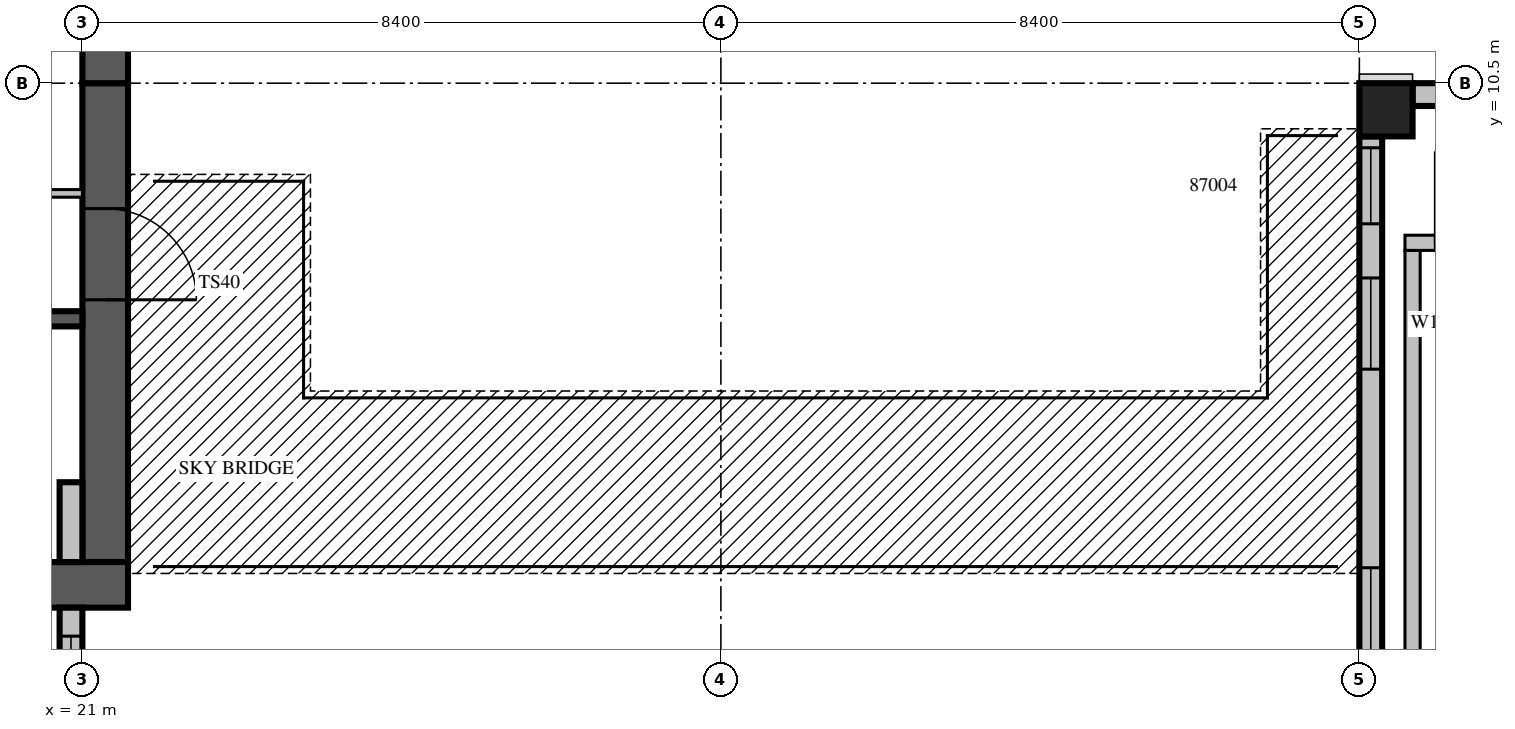
"""IFC4 building model, lengths in metres.
Left out: names, types, materials, properties, quantities, classifications, styles, units other than length and angle.
Written with IfcOpenShell. Run it as: python <this file> out.ifc"""

import sys

from ifc_helpers import new_model, si_unit, direction, frame, frame_2d, origin, origin_2d, place, context, subcontext, project, spatial, rectangle, extrude, source, transform, mapped, element, fill, save


model = new_model("IFC4")
c1 = context("Model", 3, precision=1e-05, world=origin(), true_north=direction((0.0, 1.0)))
c2 = subcontext(c1, "Body", "Model", "MODEL_VIEW")
j1 = project(units=[si_unit("LENGTHUNIT", "METRE"), si_unit("PLANEANGLEUNIT", "RADIAN")], contexts=[c1])
p1 = place(None, origin())
s1 = spatial("IfcSite", under=j1, at=p1, CompositionType="ELEMENT")
p2 = place(p1, origin())
s2 = spatial("IfcBuilding", under=s1, at=p2, CompositionType="ELEMENT")
p3 = place(p2, frame((0.0, 0.0, 305.5)))
s3 = spatial("IfcBuildingStorey", under=s2, at=p3, CompositionType="ELEMENT", Elevation=305.5)
m1 = source(origin(), c2, "Body", "SweptSolid", [
    extrude(rectangle(XDim=0.7, YDim=0.7, at=origin_2d()), origin(), (0.0, 0.0, 1.0), 3.5),
])
p4 = place(p3, frame((38.15, 10.15, 0.0), z_axis=(0.0, 0.0, 1.0), x_axis=(1.0, 0.0, 0.0)))
e1 = element("IfcColumn", 1, at=p4, inside=s3, PredefinedType="COLUMN", context=c2, shape_type="MappedRepresentation", body=[
    mapped(m1, transform((0.0, 0.0, 0.0), scale=1.0)),
])
m2 = source(origin(), c2, "Body", "SweptSolid", [
    extrude(rectangle(XDim=6.3, YDim=0.6, at=frame_2d((3.15, 0.0))), origin(), (0.0, 0.0, 1.0), 3.5),
])
p5 = place(p3, frame((21.3, 4.2, 0.0), z_axis=(0.0, 0.0, 1.0), x_axis=(0.0, 1.0, 0.0)))
e2 = element("IfcWall", 2, at=p5, inside=s3, PredefinedType="SHEAR", context=c2, shape_type="MappedRepresentation", body=[
    mapped(m2, transform((0.0, 0.0, 0.0), scale=1.0)),
])
m3 = source(origin(), c2, "Body", "SweptSolid", [
    extrude(rectangle(XDim=1.2, YDim=2.1, at=frame_2d((0.6, 1.05))), frame((0.0, 0.31, 0.0), z_axis=(0.0, -1.0, 0.0), x_axis=(1.0, 0.0, 0.0)), (0.0, 0.0, 1.0), 0.62),
])
p6 = place(p5, frame((3.45, 0.0, 0.0)))
e3 = element("IfcOpeningElement", 3, at=p6, cuts=e2, PredefinedType="OPENING", context=c2, shape_type="MappedRepresentation", body=[
    mapped(m3, transform((0.0, 0.0, 0.0), scale=1.0)),
])
m4 = source(origin(), c2, "Body", "SweptSolid", [
    extrude(rectangle(XDim=17.4, YDim=0.6, at=frame_2d((8.7, 0.0))), origin(), (0.0, 0.0, 1.0), 3.5),
])
p7 = place(p3, frame((4.2, 3.9, 0.0), z_axis=(0.0, 0.0, 1.0), x_axis=(1.0, 0.0, 0.0)))
e4 = element("IfcWall", 4, at=p7, inside=s3, PredefinedType="SHEAR", context=c2, shape_type="MappedRepresentation", body=[
    mapped(m4, transform((0.0, 0.0, 0.0), scale=1.0)),
])
m5 = source(origin(), c2, "Body", "SweptSolid", [
    extrude(rectangle(XDim=0.9, YDim=2.1, at=frame_2d((0.45, 1.05))), frame((0.0, 0.31, 0.0), z_axis=(0.0, -1.0, 0.0), x_axis=(1.0, 0.0, 0.0)), (0.0, 0.0, 1.0), 0.62),
])
p8 = place(p7, frame((12.8, 0.0, 0.0)))
e5 = element("IfcOpeningElement", 5, at=p8, cuts=e4, PredefinedType="OPENING", context=c2, shape_type="MappedRepresentation", body=[
    mapped(m5, transform((0.0, 0.0, 0.0), scale=1.0)),
])
m6 = source(origin(), c2, "Body", "SweptSolid", [
    extrude(rectangle(XDim=10.5, YDim=0.6, at=frame_2d((5.25, 0.0))), origin(), (0.0, 0.0, 1.0), 3.5),
])
p9 = place(p3, frame((21.3, 10.5, 0.0), z_axis=(0.0, 0.0, 1.0), x_axis=(0.0, 1.0, 0.0)))
e6 = element("IfcWall", 6, at=p9, inside=s3, PredefinedType="SHEAR", context=c2, shape_type="MappedRepresentation", body=[
    mapped(m6, transform((0.0, 0.0, 0.0), scale=1.0)),
])
m7 = source(origin(), c2, "Body", "SweptSolid", [
    extrude(rectangle(XDim=1.2, YDim=2.4, at=frame_2d((0.6, 1.2))), frame((0.0, 0.31, 0.0), z_axis=(0.0, -1.0, 0.0), x_axis=(1.0, 0.0, 0.0)), (0.0, 0.0, 1.0), 0.62),
])
p10 = place(p9, frame((5.7, 0.0, 0.6)))
e7 = element("IfcOpeningElement", 7, at=p10, cuts=e6, PredefinedType="OPENING", context=c2, shape_type="MappedRepresentation", body=[
    mapped(m7, transform((0.0, 0.0, 0.0), scale=1.0)),
])
m8 = source(origin(), c2, "Body", "SweptSolid", [
    extrude(rectangle(XDim=2.9, YDim=0.3, at=frame_2d((1.45, 0.0))), origin(), (0.0, 0.0, 1.0), 3.1),
])
p11 = place(p3, frame((20.85, 0.7, 0.0), z_axis=(0.0, 0.0, 1.0), x_axis=(0.0, 1.0, 0.0)))
e8 = element("IfcWall", 8, at=p11, inside=s3, PredefinedType="STANDARD", context=c2, shape_type="MappedRepresentation", body=[
    mapped(m8, transform((0.0, 0.0, 0.0), scale=1.0)),
])
m9 = source(origin(), c2, "Body", "SweptSolid", [
    extrude(rectangle(XDim=1.2, YDim=2.0, at=frame_2d((0.6, 1.0))), frame((0.0, 0.16, 0.0), z_axis=(0.0, -1.0, 0.0), x_axis=(1.0, 0.0, 0.0)), (0.0, 0.0, 1.0), 0.32),
])
p12 = place(p11, frame((1.325, 0.0, 0.6)))
e9 = element("IfcOpeningElement", 9, at=p12, cuts=e8, PredefinedType="OPENING", context=c2, shape_type="MappedRepresentation", body=[
    mapped(m9, transform((0.0, 0.0, 0.0), scale=1.0)),
])
m10 = source(origin(), c2, "Body", "SweptSolid", [
    extrude(rectangle(XDim=1.05, YDim=0.3, at=frame_2d((0.525, 0.0))), origin(), (0.0, 0.0, 1.0), 3.1),
])
p13 = place(p3, frame((20.85, 4.2, 0.0), z_axis=(0.0, 0.0, 1.0), x_axis=(0.0, 1.0, 0.0)))
e10 = element("IfcWall", 10, at=p13, inside=s3, PredefinedType="STANDARD", context=c2, shape_type="MappedRepresentation", body=[
    mapped(m10, transform((0.0, 0.0, 0.0), scale=1.0)),
])
m11 = source(origin(), c2, "Body", "SweptSolid", [
    extrude(rectangle(XDim=7.35, YDim=0.3, at=frame_2d((3.675, 0.0))), origin(), (0.0, 0.0, 1.0), 3.1),
])
p14 = place(p3, frame((45.85, 10.35, 0.0), z_axis=(0.0, 0.0, 1.0), x_axis=(-1.0, 0.0, 0.0)))
e11 = element("IfcWall", 11, at=p14, inside=s3, PredefinedType="STANDARD", context=c2, shape_type="MappedRepresentation", body=[
    mapped(m11, transform((0.0, 0.0, 0.0), scale=1.0)),
])
m12 = source(origin(), c2, "Body", "SweptSolid", [
    extrude(rectangle(XDim=3.0, YDim=2.0, at=frame_2d((1.5, 1.0))), frame((0.0, 0.16, 0.0), z_axis=(0.0, -1.0, 0.0), x_axis=(1.0, 0.0, 0.0)), (0.0, 0.0, 1.0), 0.32),
])
p15 = place(p14, frame((1.09, 0.0, 0.6)))
e12 = element("IfcOpeningElement", 12, at=p15, cuts=e11, PredefinedType="OPENING", context=c2, shape_type="MappedRepresentation", body=[
    mapped(m12, transform((0.0, 0.0, 0.0), scale=1.0)),
])
p16 = place(p14, frame((5.77, 0.0, 0.6)))
e13 = element("IfcOpeningElement", 13, at=p16, cuts=e11, PredefinedType="OPENING", context=c2, shape_type="MappedRepresentation", body=[
    mapped(m9, transform((0.0, 0.0, 0.0), scale=1.0)),
])
m13 = source(origin(), c2, "Body", "SweptSolid", [
    extrude(rectangle(XDim=9.1, YDim=0.3, at=frame_2d((4.55, 0.0))), origin(), (0.0, 0.0, 1.0), 3.1),
])
p17 = place(p3, frame((37.95, 9.8, 0.0), z_axis=(0.0, 0.0, 1.0), x_axis=(0.0, -1.0, 0.0)))
e14 = element("IfcWall", 14, at=p17, inside=s3, PredefinedType="STANDARD", context=c2, shape_type="MappedRepresentation", body=[
    mapped(m13, transform((0.0, 0.0, 0.0), scale=1.0)),
])
p18 = place(p17, frame((1.863, 0.0, 0.6)))
e15 = element("IfcOpeningElement", 15, at=p18, cuts=e14, PredefinedType="OPENING", context=c2, shape_type="MappedRepresentation", body=[
    mapped(m9, transform((0.0, 0.0, 0.0), scale=1.0)),
])
p19 = place(p17, frame((5.675, 0.0, 0.6)))
e16 = element("IfcOpeningElement", 16, at=p19, cuts=e14, PredefinedType="OPENING", context=c2, shape_type="MappedRepresentation", body=[
    mapped(m12, transform((0.0, 0.0, 0.0), scale=1.0)),
])
m14 = source(origin(), c2, "Body", "SweptSolid", [
    extrude(rectangle(XDim=1.0, YDim=2.1, at=frame_2d((0.5, 1.05))), frame((0.0, 0.16, 0.0), z_axis=(0.0, -1.0, 0.0), x_axis=(1.0, 0.0, 0.0)), (0.0, 0.0, 1.0), 0.32),
])
p20 = place(p17, frame((0.15, 0.0, 0.0)))
e17 = element("IfcOpeningElement", 17, at=p20, cuts=e14, PredefinedType="OPENING", context=c2, shape_type="MappedRepresentation", body=[
    mapped(m14, transform((0.0, 0.0, 0.0), scale=1.0)),
])
m15 = source(origin(), c2, "Body", "SweptSolid", [
    extrude(rectangle(XDim=7.2, YDim=0.2, at=frame_2d((3.6, 0.0))), origin(), (0.0, 0.0, 1.0), 3.1),
])
p21 = place(p3, frame((13.8, 7.4, 0.0), z_axis=(0.0, 0.0, 1.0), x_axis=(1.0, 0.0, 0.0)))
e18 = element("IfcWall", 18, at=p21, inside=s3, PredefinedType="SOLIDWALL", context=c2, shape_type="MappedRepresentation", body=[
    mapped(m15, transform((0.0, 0.0, 0.0), scale=1.0)),
])
m16 = source(origin(), c2, "Body", "SweptSolid", [
    extrude(rectangle(XDim=0.9, YDim=2.1, at=frame_2d((0.45, 1.05))), frame((0.0, 0.11, 0.0), z_axis=(0.0, -1.0, 0.0), x_axis=(1.0, 0.0, 0.0)), (0.0, 0.0, 1.0), 0.22),
])
p22 = place(p21, frame((3.15, 0.0, 0.0)))
e19 = element("IfcOpeningElement", 19, at=p22, cuts=e18, PredefinedType="OPENING", context=c2, shape_type="MappedRepresentation", body=[
    mapped(m16, transform((0.0, 0.0, 0.0), scale=1.0)),
])
m17 = source(origin(), c2, "Body", "SweptSolid", [
    extrude(rectangle(XDim=7.2, YDim=0.1, at=frame_2d((3.6, 0.0))), origin(), (0.0, 0.0, 1.0), 3.1),
])
p23 = place(p3, frame((13.8, 9.05, 0.0), z_axis=(0.0, 0.0, 1.0), x_axis=(1.0, 0.0, 0.0)))
e20 = element("IfcWall", 20, at=p23, inside=s3, PredefinedType="PARTITIONING", context=c2, shape_type="MappedRepresentation", body=[
    mapped(m17, transform((0.0, 0.0, 0.0), scale=1.0)),
])
m18 = source(origin(), c2, "Body", "SweptSolid", [
    extrude(rectangle(XDim=0.9, YDim=2.1, at=frame_2d((0.45, 1.05))), frame((0.0, 0.06, 0.0), z_axis=(0.0, -1.0, 0.0), x_axis=(1.0, 0.0, 0.0)), (0.0, 0.0, 1.0), 0.12),
])
p24 = place(p23, frame((5.355, 0.0, 0.0)))
e21 = element("IfcOpeningElement", 21, at=p24, cuts=e20, PredefinedType="OPENING", context=c2, shape_type="MappedRepresentation", body=[
    mapped(m18, transform((0.0, 0.0, 0.0), scale=1.0)),
])
m19 = source(origin(), c2, "Body", "SweptSolid", [
    extrude(rectangle(XDim=8.0, YDim=0.2, at=frame_2d((4.0, 0.0))), origin(), (0.0, 0.0, 1.0), 3.1),
])
p25 = place(p3, frame((38.5, 0.3, 0.0), z_axis=(0.0, 0.0, 1.0), x_axis=(0.0, 1.0, 0.0)))
e22 = element("IfcWall", 22, at=p25, inside=s3, PredefinedType="PARTITIONING", context=c2, shape_type="MappedRepresentation", body=[
    mapped(m19, transform((0.0, 0.0, 0.0), scale=1.0)),
])
m20 = source(origin(), c2, "Body", "SweptSolid", [
    extrude(rectangle(XDim=5.45, YDim=0.2, at=frame_2d((2.725, 0.0))), origin(), (0.0, 0.0, 1.0), 3.1),
])
p26 = place(p3, frame((38.4, 8.4, 0.0), z_axis=(0.0, 0.0, 1.0), x_axis=(1.0, 0.0, 0.0)))
e23 = element("IfcWall", 23, at=p26, inside=s3, PredefinedType="PARTITIONING", context=c2, shape_type="MappedRepresentation", body=[
    mapped(m20, transform((0.0, 0.0, 0.0), scale=1.0)),
])
m21 = source(origin(), c2, "Body", "SweptSolid", [
    extrude(rectangle(XDim=1.2, YDim=2.1, at=frame_2d((0.6, 1.05))), frame((0.0, 0.11, 0.0), z_axis=(0.0, -1.0, 0.0), x_axis=(1.0, 0.0, 0.0)), (0.0, 0.0, 1.0), 0.22),
])
p27 = place(p26, frame((0.4, 0.0, 0.0)))
e24 = element("IfcOpeningElement", 24, at=p27, cuts=e23, PredefinedType="OPENING", context=c2, shape_type="MappedRepresentation", body=[
    mapped(m21, transform((0.0, 0.0, 0.0), scale=1.0)),
])
p28 = place(p26, frame((3.25, 0.0, 0.0)))
e25 = element("IfcOpeningElement", 25, at=p28, cuts=e23, PredefinedType="OPENING", context=c2, shape_type="MappedRepresentation", body=[
    mapped(m16, transform((0.0, 0.0, 0.0), scale=1.0)),
])
m22 = source(origin(), c2, "Body", "SweptSolid", [
    extrude(rectangle(XDim=1.2, YDim=2.0, at=frame_2d((0.6, 1.0))), frame((0.0, 0.03, 0.0), z_axis=(0.0, -1.0, 0.0), x_axis=(1.0, 0.0, 0.0)), (0.0, 0.0, 1.0), 0.06),
])
p29 = place(p12, origin())
e26 = element("IfcWindow", 26, at=p29, inside=s3, PartitioningType="SINGLE_PANEL", PredefinedType="WINDOW", context=c2, shape_type="MappedRepresentation", body=[
    mapped(m22, transform((0.0, 0.0, 0.0), scale=1.0)),
])
fill(e9, e26)
p30 = place(p18, origin())
e27 = element("IfcWindow", 27, at=p30, inside=s3, PartitioningType="SINGLE_PANEL", PredefinedType="WINDOW", context=c2, shape_type="MappedRepresentation", body=[
    mapped(m22, transform((0.0, 0.0, 0.0), scale=1.0)),
])
fill(e15, e27)
m23 = source(origin(), c2, "Body", "SweptSolid", [
    extrude(rectangle(XDim=3.0, YDim=2.0, at=frame_2d((1.5, 1.0))), frame((0.0, 0.03, 0.0), z_axis=(0.0, -1.0, 0.0), x_axis=(1.0, 0.0, 0.0)), (0.0, 0.0, 1.0), 0.06),
])
p31 = place(p19, origin())
e28 = element("IfcWindow", 28, at=p31, inside=s3, PartitioningType="SINGLE_PANEL", PredefinedType="WINDOW", context=c2, shape_type="MappedRepresentation", body=[
    mapped(m23, transform((0.0, 0.0, 0.0), scale=1.0)),
])
fill(e16, e28)
m24 = source(origin(), c2, "Body", "SweptSolid", [
    extrude(rectangle(XDim=1.0, YDim=2.1, at=frame_2d((0.5, 1.05))), frame((0.0, 0.025, 0.0), z_axis=(0.0, -1.0, 0.0), x_axis=(1.0, 0.0, 0.0)), (0.0, 0.0, 1.0), 0.05),
])
p32 = place(p20, origin())
e29 = element("IfcDoor", 29, at=p32, inside=s3, OperationType="SLIDING_TO_LEFT", PredefinedType="DOOR", context=c2, shape_type="MappedRepresentation", body=[
    mapped(m24, transform((0.0, 0.0, 0.0), scale=1.0)),
])
fill(e17, e29)
m25 = source(origin(), c2, "Body", "SweptSolid", [
    extrude(rectangle(XDim=1.2, YDim=2.1, at=frame_2d((0.6, 1.05))), frame((0.0, 0.025, 0.0), z_axis=(0.0, -1.0, 0.0), x_axis=(1.0, 0.0, 0.0)), (0.0, 0.0, 1.0), 0.05),
])
p33 = place(p6, origin())
e30 = element("IfcDoor", 30, at=p33, inside=s3, OperationType="SINGLE_SWING_RIGHT", PredefinedType="DOOR", context=c2, shape_type="MappedRepresentation", body=[
    mapped(m25, transform((0.0, 0.0, 0.0), scale=1.0)),
])
fill(e3, e30)
save(model, sys.argv[1])
